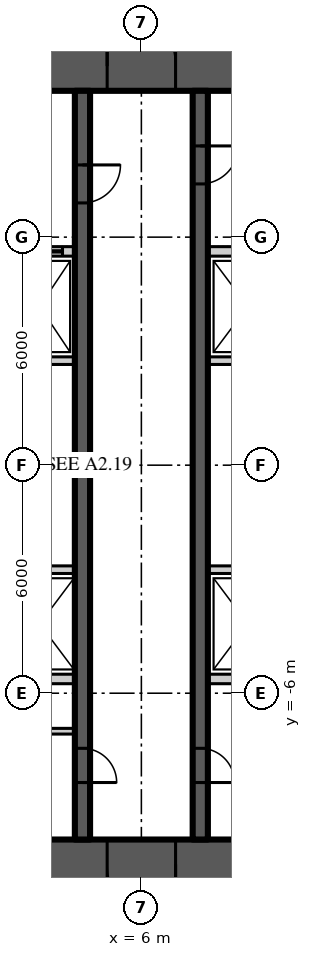
"""IFC4 building model, lengths in metres.
Left out: names, types, materials, properties, quantities, classifications, styles, units other than length and angle.
Written with IfcOpenShell. Run it as: python <this file> out.ifc"""

import sys

from ifc_helpers import new_model, si_unit, direction, frame, frame_2d, origin, place, context, subcontext, project, spatial, rectangle, extrude, element, fill, save


model = new_model("IFC4")
c1 = context("Model", 3, precision=1e-05, world=origin(), true_north=direction((0.0, 1.0)))
c2 = subcontext(c1, "Body", "Model", "MODEL_VIEW")
j1 = project(units=[si_unit("LENGTHUNIT", "METRE"), si_unit("PLANEANGLEUNIT", "RADIAN")], contexts=[c1])
p1 = place(None, origin())
s1 = spatial("IfcSite", under=j1, at=p1, CompositionType="ELEMENT")
p2 = place(p1, origin())
s2 = spatial("IfcBuilding", under=s1, at=p2, CompositionType="ELEMENT")
p3 = place(p2, frame((0.0, 0.0, 128.1)))
s3 = spatial("IfcBuildingStorey", under=s2, at=p3, CompositionType="ELEMENT", Elevation=128.1)
p4 = place(p3, frame((-11.15, 10.5, 0.0), z_axis=(0.0, 0.0, 1.0), x_axis=(1.0, 0.0, 0.0)))
e1 = element("IfcWall", 1, at=p4, inside=s3, PredefinedType="SHEAR", context=c2, shape_type="SweptSolid", body=[
    extrude(rectangle(XDim=22.3, YDim=1.3, at=frame_2d((11.15, 0.0))), origin(), (0.0, 0.0, 1.0), 3.9),
])
p5 = place(p4, frame((4.25, 0.0, 0.0)))
e2 = element("IfcOpeningElement", 2, at=p5, cuts=e1, PredefinedType="OPENING", context=c2, shape_type="SweptSolid", body=[
    extrude(rectangle(XDim=1.8, YDim=2.2, at=frame_2d((0.9, 1.1))), frame((0.0, 0.66, 0.0), z_axis=(0.0, -1.0, 0.0), x_axis=(1.0, 0.0, 0.0)), (0.0, 0.0, 1.0), 1.32),
])
p6 = place(p4, frame((16.25, 0.0, 0.0)))
e3 = element("IfcOpeningElement", 3, at=p6, cuts=e1, PredefinedType="OPENING", context=c2, shape_type="SweptSolid", body=[
    extrude(rectangle(XDim=1.8, YDim=2.2, at=frame_2d((0.9, 1.1))), frame((0.0, 0.66, 0.0), z_axis=(0.0, -1.0, 0.0), x_axis=(1.0, 0.0, 0.0)), (0.0, 0.0, 1.0), 1.32),
])
p7 = place(p3, frame((11.15, -10.5, 0.0), z_axis=(0.0, 0.0, 1.0), x_axis=(-1.0, 0.0, 0.0)))
e4 = element("IfcWall", 4, at=p7, inside=s3, PredefinedType="SHEAR", context=c2, shape_type="SweptSolid", body=[
    extrude(rectangle(XDim=22.3, YDim=1.3, at=frame_2d((11.15, 0.0))), origin(), (0.0, 0.0, 1.0), 3.9),
])
p8 = place(p7, frame((16.25, 0.0, 0.0)))
e5 = element("IfcOpeningElement", 5, at=p8, cuts=e4, PredefinedType="OPENING", context=c2, shape_type="SweptSolid", body=[
    extrude(rectangle(XDim=1.8, YDim=2.2, at=frame_2d((0.9, 1.1))), frame((0.0, 0.66, 0.0), z_axis=(0.0, -1.0, 0.0), x_axis=(1.0, 0.0, 0.0)), (0.0, 0.0, 1.0), 1.32),
])
p9 = place(p7, frame((4.25, 0.0, 0.0)))
e6 = element("IfcOpeningElement", 6, at=p9, cuts=e4, PredefinedType="OPENING", context=c2, shape_type="SweptSolid", body=[
    extrude(rectangle(XDim=1.8, YDim=2.2, at=frame_2d((0.9, 1.1))), frame((0.0, 0.66, 0.0), z_axis=(0.0, -1.0, 0.0), x_axis=(1.0, 0.0, 0.0)), (0.0, 0.0, 1.0), 1.32),
])
p10 = place(p3, frame((7.55, 9.85, 0.0), z_axis=(0.0, 0.0, 1.0), x_axis=(0.0, -1.0, 0.0)))
e7 = element("IfcWall", 7, at=p10, inside=s3, PredefinedType="SHEAR", context=c2, shape_type="SweptSolid", body=[
    extrude(rectangle(XDim=19.7, YDim=0.4, at=frame_2d((9.85, 0.0))), origin(), (0.0, 0.0, 1.0), 3.9),
])
p11 = place(p10, frame((1.45, 0.0, 0.0)))
e8 = element("IfcOpeningElement", 8, at=p11, cuts=e7, PredefinedType="OPENING", context=c2, shape_type="SweptSolid", body=[
    extrude(rectangle(XDim=1.0, YDim=2.2, at=frame_2d((0.5, 1.1))), frame((0.0, 0.21, 0.0), z_axis=(0.0, -1.0, 0.0), x_axis=(1.0, 0.0, 0.0)), (0.0, 0.0, 1.0), 0.42),
])
p12 = place(p10, frame((17.3, 0.0, 0.0)))
e9 = element("IfcOpeningElement", 9, at=p12, cuts=e7, PredefinedType="OPENING", context=c2, shape_type="SweptSolid", body=[
    extrude(rectangle(XDim=0.9, YDim=2.1, at=frame_2d((0.45, 1.05))), frame((0.0, 0.21, 0.0), z_axis=(0.0, -1.0, 0.0), x_axis=(1.0, 0.0, 0.0)), (0.0, 0.0, 1.0), 0.42),
])
p13 = place(p3, frame((4.45, 9.85, 0.0), z_axis=(0.0, 0.0, 1.0), x_axis=(0.0, -1.0, 0.0)))
e10 = element("IfcWall", 10, at=p13, inside=s3, PredefinedType="SHEAR", context=c2, shape_type="SweptSolid", body=[
    extrude(rectangle(XDim=19.7, YDim=0.4, at=frame_2d((9.85, 0.0))), origin(), (0.0, 0.0, 1.0), 3.9),
])
p14 = place(p13, frame((1.95, 0.0, 0.0)))
e11 = element("IfcOpeningElement", 11, at=p14, cuts=e10, PredefinedType="OPENING", context=c2, shape_type="SweptSolid", body=[
    extrude(rectangle(XDim=1.0, YDim=2.2, at=frame_2d((0.5, 1.1))), frame((0.0, 0.21, 0.0), z_axis=(0.0, -1.0, 0.0), x_axis=(1.0, 0.0, 0.0)), (0.0, 0.0, 1.0), 0.42),
])
p15 = place(p13, frame((17.3, 0.0, 0.0)))
e12 = element("IfcOpeningElement", 12, at=p15, cuts=e10, PredefinedType="OPENING", context=c2, shape_type="SweptSolid", body=[
    extrude(rectangle(XDim=0.9, YDim=2.1, at=frame_2d((0.45, 1.05))), frame((0.0, 0.21, 0.0), z_axis=(0.0, -1.0, 0.0), x_axis=(1.0, 0.0, 0.0)), (0.0, 0.0, 1.0), 0.42),
])
p16 = place(p3, frame((2.4, 5.625, 0.0), z_axis=(0.0, 0.0, 1.0), x_axis=(1.0, 0.0, 0.0)))
e13 = element("IfcWall", 13, at=p16, inside=s3, PredefinedType="SOLIDWALL", context=c2, shape_type="SweptSolid", body=[
    extrude(rectangle(XDim=1.85, YDim=0.25, at=frame_2d((0.925, 0.0))), origin(), (0.0, 0.0, 1.0), 3.7),
])
p17 = place(p16, frame((0.325, 0.0, 0.0)))
e14 = element("IfcOpeningElement", 14, at=p17, cuts=e13, PredefinedType="OPENING", context=c2, shape_type="SweptSolid", body=[
    extrude(rectangle(XDim=1.2, YDim=2.2, at=frame_2d((0.6, 1.1))), frame((0.0, 0.135, 0.0), z_axis=(0.0, -1.0, 0.0), x_axis=(1.0, 0.0, 0.0)), (0.0, 0.0, 1.0), 0.27),
])
p18 = place(p3, frame((7.75, 5.625, 0.0), z_axis=(0.0, 0.0, 1.0), x_axis=(1.0, 0.0, 0.0)))
e15 = element("IfcWall", 15, at=p18, inside=s3, PredefinedType="SOLIDWALL", context=c2, shape_type="SweptSolid", body=[
    extrude(rectangle(XDim=2.1, YDim=0.25, at=frame_2d((1.05, 0.0))), origin(), (0.0, 0.0, 1.0), 3.7),
])
p19 = place(p3, frame((2.4, -5.625, 0.0), z_axis=(0.0, 0.0, 1.0), x_axis=(1.0, 0.0, 0.0)))
e16 = element("IfcWall", 16, at=p19, inside=s3, PredefinedType="SOLIDWALL", context=c2, shape_type="SweptSolid", body=[
    extrude(rectangle(XDim=1.85, YDim=0.25, at=frame_2d((0.925, 0.0))), origin(), (0.0, 0.0, 1.0), 3.7),
])
p20 = place(p3, frame((7.75, -5.625, 0.0), z_axis=(0.0, 0.0, 1.0), x_axis=(1.0, 0.0, 0.0)))
e17 = element("IfcWall", 17, at=p20, inside=s3, PredefinedType="SOLIDWALL", context=c2, shape_type="SweptSolid", body=[
    extrude(rectangle(XDim=2.1, YDim=0.25, at=frame_2d((1.05, 0.0))), origin(), (0.0, 0.0, 1.0), 3.7),
])
p21 = place(p3, frame((2.4, -2.75, 0.0), z_axis=(0.0, 0.0, 1.0), x_axis=(1.0, 0.0, 0.0)))
e18 = element("IfcWall", 18, at=p21, inside=s3, PredefinedType="SOLIDWALL", context=c2, shape_type="SweptSolid", body=[
    extrude(rectangle(XDim=1.85, YDim=0.2, at=frame_2d((0.925, 0.0))), origin(), (0.0, 0.0, 1.0), 3.7),
])
p22 = place(p3, frame((7.75, -2.75, 0.0), z_axis=(0.0, 0.0, 1.0), x_axis=(1.0, 0.0, 0.0)))
e19 = element("IfcWall", 19, at=p22, inside=s3, PredefinedType="SOLIDWALL", context=c2, shape_type="SweptSolid", body=[
    extrude(rectangle(XDim=2.1, YDim=0.2, at=frame_2d((1.05, 0.0))), origin(), (0.0, 0.0, 1.0), 3.7),
])
p23 = place(p3, frame((2.4, 2.75, 0.0), z_axis=(0.0, 0.0, 1.0), x_axis=(1.0, 0.0, 0.0)))
e20 = element("IfcWall", 20, at=p23, inside=s3, PredefinedType="SOLIDWALL", context=c2, shape_type="SweptSolid", body=[
    extrude(rectangle(XDim=1.85, YDim=0.2, at=frame_2d((0.925, 0.0))), origin(), (0.0, 0.0, 1.0), 3.7),
])
p24 = place(p3, frame((7.75, 2.75, 0.0), z_axis=(0.0, 0.0, 1.0), x_axis=(1.0, 0.0, 0.0)))
e21 = element("IfcWall", 21, at=p24, inside=s3, PredefinedType="SOLIDWALL", context=c2, shape_type="SweptSolid", body=[
    extrude(rectangle(XDim=2.1, YDim=0.2, at=frame_2d((1.05, 0.0))), origin(), (0.0, 0.0, 1.0), 3.7),
])
p25 = place(p3, frame((2.4, -7.0, 0.0), z_axis=(0.0, 0.0, 1.0), x_axis=(1.0, 0.0, 0.0)))
e22 = element("IfcWall", 22, at=p25, inside=s3, PredefinedType="SOLIDWALL", context=c2, shape_type="SweptSolid", body=[
    extrude(rectangle(XDim=1.85, YDim=0.15, at=frame_2d((0.925, 0.0))), origin(), (0.0, 0.0, 1.0), 3.77),
])
p26 = place(p25, frame((0.1, 0.0, 0.0)))
e23 = element("IfcOpeningElement", 23, at=p26, cuts=e22, PredefinedType="OPENING", context=c2, shape_type="SweptSolid", body=[
    extrude(rectangle(XDim=0.9, YDim=2.1, at=frame_2d((0.45, 1.05))), frame((0.0, 0.085, 0.0), z_axis=(0.0, -1.0, 0.0), x_axis=(1.0, 0.0, 0.0)), (0.0, 0.0, 1.0), 0.17),
])
p27 = place(p6, origin())
e24 = element("IfcDoor", 24, at=p27, inside=s3, OperationType="DOUBLE_DOOR_DOUBLE_SWING", PredefinedType="DOOR", context=c2, shape_type="SweptSolid", body=[
    extrude(rectangle(XDim=1.8, YDim=2.2, at=frame_2d((0.9, 1.1))), frame((0.0, 0.025, 0.0), z_axis=(0.0, -1.0, 0.0), x_axis=(1.0, 0.0, 0.0)), (0.0, 0.0, 1.0), 0.05),
])
fill(e3, e24)
p28 = place(p9, origin())
e25 = element("IfcDoor", 25, at=p28, inside=s3, OperationType="DOUBLE_DOOR_DOUBLE_SWING", PredefinedType="DOOR", context=c2, shape_type="SweptSolid", body=[
    extrude(rectangle(XDim=1.8, YDim=2.2, at=frame_2d((0.9, 1.1))), frame((0.0, 0.025, 0.0), z_axis=(0.0, -1.0, 0.0), x_axis=(1.0, 0.0, 0.0)), (0.0, 0.0, 1.0), 0.05),
])
fill(e6, e25)
p29 = place(p11, origin())
e26 = element("IfcDoor", 26, at=p29, inside=s3, OperationType="SINGLE_SWING_LEFT", PredefinedType="DOOR", context=c2, shape_type="SweptSolid", body=[
    extrude(rectangle(XDim=1.0, YDim=2.2, at=frame_2d((0.5, 1.1))), frame((0.0, 0.025, 0.0), z_axis=(0.0, -1.0, 0.0), x_axis=(1.0, 0.0, 0.0)), (0.0, 0.0, 1.0), 0.05),
])
fill(e8, e26)
p30 = place(p14, origin())
e27 = element("IfcDoor", 27, at=p30, inside=s3, OperationType="SINGLE_SWING_LEFT", PredefinedType="DOOR", context=c2, shape_type="SweptSolid", body=[
    extrude(rectangle(XDim=1.0, YDim=2.2, at=frame_2d((0.5, 1.1))), frame((0.0, 0.025, 0.0), z_axis=(0.0, -1.0, 0.0), x_axis=(1.0, 0.0, 0.0)), (0.0, 0.0, 1.0), 0.05),
])
fill(e11, e27)
p31 = place(p12, origin())
e28 = element("IfcDoor", 28, at=p31, inside=s3, OperationType="SINGLE_SWING_RIGHT", PredefinedType="DOOR", context=c2, shape_type="SweptSolid", body=[
    extrude(rectangle(XDim=0.9, YDim=2.1, at=frame_2d((0.45, 1.05))), frame((0.0, 0.025, 0.0), z_axis=(0.0, -1.0, 0.0), x_axis=(1.0, 0.0, 0.0)), (0.0, 0.0, 1.0), 0.05),
])
fill(e9, e28)
p32 = place(p15, origin())
e29 = element("IfcDoor", 29, at=p32, inside=s3, OperationType="SINGLE_SWING_RIGHT", PredefinedType="DOOR", context=c2, shape_type="SweptSolid", body=[
    extrude(rectangle(XDim=0.9, YDim=2.1, at=frame_2d((0.45, 1.05))), frame((0.0, 0.025, 0.0), z_axis=(0.0, -1.0, 0.0), x_axis=(1.0, 0.0, 0.0)), (0.0, 0.0, 1.0), 0.05),
])
fill(e12, e29)
p33 = place(p17, origin())
e30 = element("IfcDoor", 30, at=p33, inside=s3, OperationType="SLIDING_TO_LEFT", PredefinedType="DOOR", context=c2, shape_type="SweptSolid", body=[
    extrude(rectangle(XDim=1.2, YDim=2.2, at=frame_2d((0.6, 1.1))), frame((0.0, 0.025, 0.0), z_axis=(0.0, -1.0, 0.0), x_axis=(1.0, 0.0, 0.0)), (0.0, 0.0, 1.0), 0.05),
])
fill(e14, e30)
save(model, sys.argv[1])
